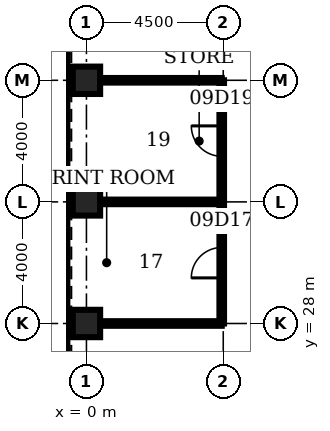
"""IFC4 building model, lengths in metres.
Left out: names, types, materials, properties, quantities, classifications, styles, units other than length and angle.
Written with IfcOpenShell. Run it as: python <this file> out.ifc"""

import sys

from ifc_helpers import new_model, si_unit, direction, frame, frame_2d, origin, origin_2d, place, context, subcontext, project, spatial, rectangle, hollow_rectangle, extrude, element, fill, save


model = new_model("IFC4")
c1 = context("Model", 3, precision=1e-05, world=origin(), true_north=direction((0.0, 1.0)))
c2 = subcontext(c1, "Body", "Model", "MODEL_VIEW")
j1 = project(units=[si_unit("LENGTHUNIT", "METRE"), si_unit("PLANEANGLEUNIT", "RADIAN")], contexts=[c1])
p1 = place(None, origin())
s1 = spatial("IfcSite", under=j1, at=p1, CompositionType="ELEMENT")
p2 = place(p1, origin())
s2 = spatial("IfcBuilding", under=s1, at=p2, CompositionType="ELEMENT")
p3 = place(p2, frame((0.0, 0.0, 45.5)))
s3 = spatial("IfcBuildingStorey", under=s2, at=p3, CompositionType="ELEMENT", Elevation=45.5)
for number, where, z_axis, x_axis in (
    (1, (0.0, 36.0, 0.0), (0.0, 0.0, 1.0), (1.0, 0.0, 0.0)),
    (2, (0.0, 32.0, 0.0), (0.0, 0.0, 1.0), (1.0, 0.0, 0.0)),
    (3, (0.0, 28.0, 0.0), (0.0, 0.0, 1.0), (1.0, 0.0, 0.0)),
):
    element("IfcColumn", number, at=place(p3, frame(where, z_axis=z_axis, x_axis=x_axis)), inside=s3, PredefinedType="COLUMN", context=c2, shape_type="SweptSolid", body=[
        extrude(hollow_rectangle(XDim=0.9, YDim=0.9, WallThickness=0.12, at=origin_2d()), origin(), (0.0, 0.0, 1.0), 4.5),
    ])
for number, where, z_axis, x_axis in (
    (4, (0.45, 28.0, 0.0), (0.0, 0.0, 1.0), (1.0, 0.0, 0.0)),
    (5, (0.45, 32.0, 0.0), (0.0, 0.0, 1.0), (1.0, 0.0, 0.0)),
    (6, (0.45, 36.0, 0.0), (0.0, 0.0, 1.0), (1.0, 0.0, 0.0)),
):
    element("IfcWall", number, at=place(p3, frame(where, z_axis=z_axis, x_axis=x_axis)), inside=s3, PredefinedType="PARTITIONING", context=c2, shape_type="SweptSolid", body=[
        extrude(rectangle(XDim=4.0, YDim=0.15, at=frame_2d((2.0, 0.0))), origin(), (0.0, 0.0, 1.0), 3.0),
    ])
p4 = place(p3, frame((4.45, 28.0, 0.0), z_axis=(0.0, 0.0, 1.0), x_axis=(0.0, 1.0, 0.0)))
e7 = element("IfcWall", 7, at=p4, inside=s3, PredefinedType="PARTITIONING", context=c2, shape_type="SweptSolid", body=[
    extrude(rectangle(XDim=8.0, YDim=0.15, at=frame_2d((4.0, 0.0))), origin(), (0.0, 0.0, 1.0), 3.0),
])
p5 = place(p4, frame((1.5, 0.0, 0.0)))
e8 = element("IfcOpeningElement", 8, at=p5, cuts=e7, PredefinedType="OPENING", context=c2, shape_type="SweptSolid", body=[
    extrude(rectangle(XDim=1.0, YDim=2.1, at=frame_2d((0.5, 1.05))), frame((0.0, 0.085, 0.0), z_axis=(0.0, -1.0, 0.0), x_axis=(1.0, 0.0, 0.0)), (0.0, 0.0, 1.0), 0.17),
])
p6 = place(p4, frame((5.5, 0.0, 0.0)))
e9 = element("IfcOpeningElement", 9, at=p6, cuts=e7, PredefinedType="OPENING", context=c2, shape_type="SweptSolid", body=[
    extrude(rectangle(XDim=1.0, YDim=2.1, at=frame_2d((0.5, 1.05))), frame((0.0, 0.085, 0.0), z_axis=(0.0, -1.0, 0.0), x_axis=(1.0, 0.0, 0.0)), (0.0, 0.0, 1.0), 0.17),
])
p7 = place(p5, origin())
e10 = element("IfcDoor", 10, at=p7, inside=s3, OperationType="SINGLE_SWING_LEFT", PredefinedType="DOOR", context=c2, shape_type="SweptSolid", body=[
    extrude(rectangle(XDim=1.0, YDim=2.1, at=frame_2d((0.5, 1.05))), frame((0.0, 0.025, 0.0), z_axis=(0.0, -1.0, 0.0), x_axis=(1.0, 0.0, 0.0)), (0.0, 0.0, 1.0), 0.05),
])
fill(e8, e10)
p8 = place(p6, origin())
e11 = element("IfcDoor", 11, at=p8, inside=s3, OperationType="SINGLE_SWING_RIGHT", PredefinedType="DOOR", context=c2, shape_type="SweptSolid", body=[
    extrude(rectangle(XDim=1.0, YDim=2.1, at=frame_2d((0.5, 1.05))), frame((0.0, 0.025, 0.0), z_axis=(0.0, -1.0, 0.0), x_axis=(1.0, 0.0, 0.0)), (0.0, 0.0, 1.0), 0.05),
])
fill(e9, e11)
save(model, sys.argv[1])
